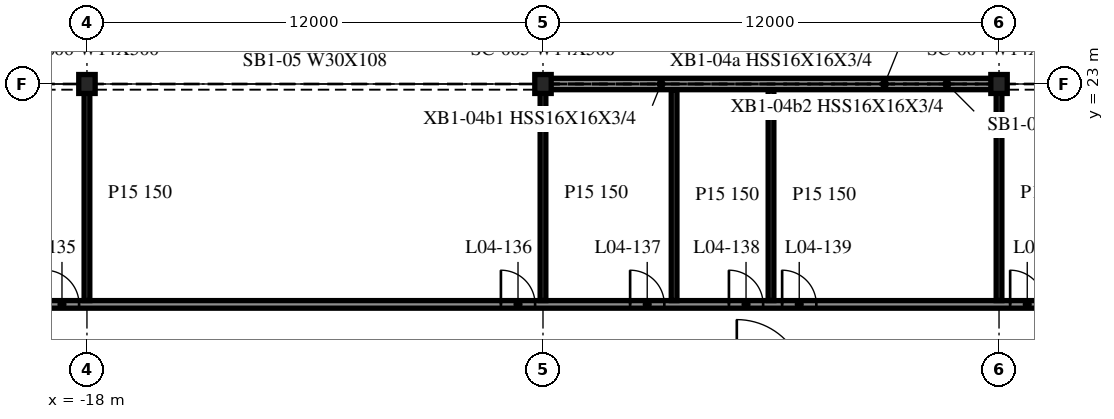
"""IFC4 building model, lengths in metres.
Left out: names, types, materials, properties, quantities, classifications, styles, units other than length and angle.
Written with IfcOpenShell. Run it as: python <this file> out.ifc"""

import sys

from ifc_helpers import new_model, si_unit, direction, frame, frame_2d, origin, origin_2d, place, context, subcontext, project, spatial, rectangle, i_section, extrude, element, fill, save


model = new_model("IFC4")
c1 = context("Model", 3, precision=1e-05, world=origin(), true_north=direction((0.0, 1.0)))
c2 = subcontext(c1, "Body", "Model", "MODEL_VIEW")
j1 = project(units=[si_unit("LENGTHUNIT", "METRE"), si_unit("PLANEANGLEUNIT", "RADIAN")], contexts=[c1])
p1 = place(None, origin())
s1 = spatial("IfcSite", under=j1, at=p1, CompositionType="ELEMENT")
p2 = place(p1, origin())
s2 = spatial("IfcBuilding", under=s1, at=p2, CompositionType="ELEMENT")
p3 = place(p2, frame((0.0, 0.0, 20.1)))
s3 = spatial("IfcBuildingStorey", under=s2, at=p3, CompositionType="ELEMENT", Elevation=20.1)
for number, where, z_axis, x_axis in (
    (1, (6.0, 23.0, -0.34), (0.0, 0.0, 1.0), (1.0, 0.0, 0.0)),
    (2, (-6.0, 23.0, -0.34), (0.0, 0.0, 1.0), (1.0, 0.0, 0.0)),
    (3, (-18.0, 23.0, -0.34), (0.0, 0.0, 1.0), (1.0, 0.0, 0.0)),
):
    element("IfcColumn", number, at=place(p3, frame(where, z_axis=z_axis, x_axis=x_axis)), inside=s3, PredefinedType="COLUMN", context=c2, shape_type="SweptSolid", body=[
        extrude(i_section(OverallWidth=0.432, OverallDepth=0.498, WebThickness=0.056, FlangeThickness=0.089, at=origin_2d()), origin(), (0.0, 0.0, 1.0), 4.3),
    ])
p4 = place(p3, frame((5.972, 23.0, 0.0), z_axis=(0.0, 0.0, 1.0), x_axis=(-1.0, 0.0, 0.0)))
e4 = element("IfcWall", 4, at=p4, inside=s3, PredefinedType="NOTDEFINED", context=c2, shape_type="SweptSolid", body=[
    extrude(rectangle(XDim=11.944, YDim=0.3, at=frame_2d((5.972, 0.0))), origin(), (0.0, 0.0, 1.0), 3.203),
])
p5 = place(p3, frame((-47.807, 17.2, 0.0), z_axis=(0.0, 0.0, 1.0), x_axis=(1.0, 0.0, 0.0)))
e5 = element("IfcWall", 5, at=p5, inside=s3, PredefinedType="PARTITIONING", context=c2, shape_type="SweptSolid", body=[
    extrude(rectangle(XDim=95.615, YDim=0.2, at=frame_2d((47.807, 0.0))), origin(), (0.0, 0.0, 1.0), 3.96),
])
p6 = place(p5, frame((4.7, 0.0, 0.0)))
e6 = element("IfcOpeningElement", 6, at=p6, cuts=e5, PredefinedType="OPENING", context=c2, shape_type="SweptSolid", body=[
    extrude(rectangle(XDim=0.9, YDim=2.1, at=frame_2d((0.45, 1.05))), frame((0.0, 0.11, 0.0), z_axis=(0.0, -1.0, 0.0), x_axis=(1.0, 0.0, 0.0)), (0.0, 0.0, 1.0), 0.22),
])
p7 = place(p5, frame((16.7, 0.0, 0.0)))
e7 = element("IfcOpeningElement", 7, at=p7, cuts=e5, PredefinedType="OPENING", context=c2, shape_type="SweptSolid", body=[
    extrude(rectangle(XDim=0.9, YDim=2.1, at=frame_2d((0.45, 1.05))), frame((0.0, 0.11, 0.0), z_axis=(0.0, -1.0, 0.0), x_axis=(1.0, 0.0, 0.0)), (0.0, 0.0, 1.0), 0.22),
])
p8 = place(p5, frame((20.1, 0.0, 0.0)))
e8 = element("IfcOpeningElement", 8, at=p8, cuts=e5, PredefinedType="OPENING", context=c2, shape_type="SweptSolid", body=[
    extrude(rectangle(XDim=0.9, YDim=2.1, at=frame_2d((0.45, 1.05))), frame((0.0, 0.11, 0.0), z_axis=(0.0, -1.0, 0.0), x_axis=(1.0, 0.0, 0.0)), (0.0, 0.0, 1.0), 0.22),
])
p9 = place(p5, frame((22.7, 0.0, 0.0)))
e9 = element("IfcOpeningElement", 9, at=p9, cuts=e5, PredefinedType="OPENING", context=c2, shape_type="SweptSolid", body=[
    extrude(rectangle(XDim=0.9, YDim=2.1, at=frame_2d((0.45, 1.05))), frame((0.0, 0.11, 0.0), z_axis=(0.0, -1.0, 0.0), x_axis=(1.0, 0.0, 0.0)), (0.0, 0.0, 1.0), 0.22),
])
p10 = place(p5, frame((28.7, 0.0, 0.0)))
e10 = element("IfcOpeningElement", 10, at=p10, cuts=e5, PredefinedType="OPENING", context=c2, shape_type="SweptSolid", body=[
    extrude(rectangle(XDim=0.9, YDim=2.1, at=frame_2d((0.45, 1.05))), frame((0.0, 0.11, 0.0), z_axis=(0.0, -1.0, 0.0), x_axis=(1.0, 0.0, 0.0)), (0.0, 0.0, 1.0), 0.22),
])
p11 = place(p5, frame((40.7, 0.0, 0.0)))
e11 = element("IfcOpeningElement", 11, at=p11, cuts=e5, PredefinedType="OPENING", context=c2, shape_type="SweptSolid", body=[
    extrude(rectangle(XDim=0.9, YDim=2.1, at=frame_2d((0.45, 1.05))), frame((0.0, 0.11, 0.0), z_axis=(0.0, -1.0, 0.0), x_axis=(1.0, 0.0, 0.0)), (0.0, 0.0, 1.0), 0.22),
])
p12 = place(p5, frame((44.1, 0.0, 0.0)))
e12 = element("IfcOpeningElement", 12, at=p12, cuts=e5, PredefinedType="OPENING", context=c2, shape_type="SweptSolid", body=[
    extrude(rectangle(XDim=0.9, YDim=2.1, at=frame_2d((0.45, 1.05))), frame((0.0, 0.11, 0.0), z_axis=(0.0, -1.0, 0.0), x_axis=(1.0, 0.0, 0.0)), (0.0, 0.0, 1.0), 0.22),
])
p13 = place(p5, frame((46.7, 0.0, 0.0)))
e13 = element("IfcOpeningElement", 13, at=p13, cuts=e5, PredefinedType="OPENING", context=c2, shape_type="SweptSolid", body=[
    extrude(rectangle(XDim=0.9, YDim=2.1, at=frame_2d((0.45, 1.05))), frame((0.0, 0.11, 0.0), z_axis=(0.0, -1.0, 0.0), x_axis=(1.0, 0.0, 0.0)), (0.0, 0.0, 1.0), 0.22),
])
p14 = place(p5, frame((48.1, 0.0, 0.0)))
e14 = element("IfcOpeningElement", 14, at=p14, cuts=e5, PredefinedType="OPENING", context=c2, shape_type="SweptSolid", body=[
    extrude(rectangle(XDim=0.9, YDim=2.1, at=frame_2d((0.45, 1.05))), frame((0.0, 0.11, 0.0), z_axis=(0.0, -1.0, 0.0), x_axis=(1.0, 0.0, 0.0)), (0.0, 0.0, 1.0), 0.22),
])
p15 = place(p5, frame((54.1, 0.0, 0.0)))
e15 = element("IfcOpeningElement", 15, at=p15, cuts=e5, PredefinedType="OPENING", context=c2, shape_type="SweptSolid", body=[
    extrude(rectangle(XDim=0.9, YDim=2.1, at=frame_2d((0.45, 1.05))), frame((0.0, 0.11, 0.0), z_axis=(0.0, -1.0, 0.0), x_axis=(1.0, 0.0, 0.0)), (0.0, 0.0, 1.0), 0.22),
])
p16 = place(p5, frame((66.1, 0.0, 0.0)))
e16 = element("IfcOpeningElement", 16, at=p16, cuts=e5, PredefinedType="OPENING", context=c2, shape_type="SweptSolid", body=[
    extrude(rectangle(XDim=0.9, YDim=2.1, at=frame_2d((0.45, 1.05))), frame((0.0, 0.11, 0.0), z_axis=(0.0, -1.0, 0.0), x_axis=(1.0, 0.0, 0.0)), (0.0, 0.0, 1.0), 0.22),
])
p17 = place(p5, frame((69.5, 0.0, 0.0)))
e17 = element("IfcOpeningElement", 17, at=p17, cuts=e5, PredefinedType="OPENING", context=c2, shape_type="SweptSolid", body=[
    extrude(rectangle(XDim=0.9, YDim=2.1, at=frame_2d((0.45, 1.05))), frame((0.0, 0.11, 0.0), z_axis=(0.0, -1.0, 0.0), x_axis=(1.0, 0.0, 0.0)), (0.0, 0.0, 1.0), 0.22),
])
p18 = place(p5, frame((72.1, 0.0, 0.0)))
e18 = element("IfcOpeningElement", 18, at=p18, cuts=e5, PredefinedType="OPENING", context=c2, shape_type="SweptSolid", body=[
    extrude(rectangle(XDim=0.9, YDim=2.1, at=frame_2d((0.45, 1.05))), frame((0.0, 0.11, 0.0), z_axis=(0.0, -1.0, 0.0), x_axis=(1.0, 0.0, 0.0)), (0.0, 0.0, 1.0), 0.22),
])
p19 = place(p5, frame((78.1, 0.0, 0.0)))
e19 = element("IfcOpeningElement", 19, at=p19, cuts=e5, PredefinedType="OPENING", context=c2, shape_type="SweptSolid", body=[
    extrude(rectangle(XDim=0.9, YDim=2.1, at=frame_2d((0.45, 1.05))), frame((0.0, 0.11, 0.0), z_axis=(0.0, -1.0, 0.0), x_axis=(1.0, 0.0, 0.0)), (0.0, 0.0, 1.0), 0.22),
])
p20 = place(p5, frame((90.1, 0.0, 0.0)))
e20 = element("IfcOpeningElement", 20, at=p20, cuts=e5, PredefinedType="OPENING", context=c2, shape_type="SweptSolid", body=[
    extrude(rectangle(XDim=0.9, YDim=2.1, at=frame_2d((0.45, 1.05))), frame((0.0, 0.11, 0.0), z_axis=(0.0, -1.0, 0.0), x_axis=(1.0, 0.0, 0.0)), (0.0, 0.0, 1.0), 0.22),
])
for number, where, z_axis, x_axis in (
    (21, (-18.0, 17.3, 0.0), (0.0, 0.0, 1.0), (0.0, 1.0, 0.0)),
    (22, (-6.0, 17.3, 0.0), (0.0, 0.0, 1.0), (0.0, 1.0, 0.0)),
):
    element("IfcWall", number, at=place(p3, frame(where, z_axis=z_axis, x_axis=x_axis)), inside=s3, PredefinedType="PARTITIONING", context=c2, shape_type="SweptSolid", body=[
        extrude(rectangle(XDim=5.675, YDim=0.15, at=frame_2d((2.837, 0.0))), origin(), (0.0, 0.0, 1.0), 3.96),
    ])
for number, where, z_axis, x_axis in (
    (23, (-2.55, 17.3, 0.0), (0.0, 0.0, 1.0), (0.0, 1.0, 0.0)),
    (24, (0.0, 17.3, 0.0), (0.0, 0.0, 1.0), (0.0, 1.0, 0.0)),
):
    element("IfcWall", number, at=place(p3, frame(where, z_axis=z_axis, x_axis=x_axis)), inside=s3, PredefinedType="PARTITIONING", context=c2, shape_type="SweptSolid", body=[
        extrude(rectangle(XDim=5.55, YDim=0.15, at=frame_2d((2.775, 0.0))), origin(), (0.0, 0.0, 1.0), 3.96),
    ])
p21 = place(p3, frame((6.0, 17.3, 0.0), z_axis=(0.0, 0.0, 1.0), x_axis=(0.0, 1.0, 0.0)))
e25 = element("IfcWall", 25, at=p21, inside=s3, PredefinedType="PARTITIONING", context=c2, shape_type="SweptSolid", body=[
    extrude(rectangle(XDim=5.675, YDim=0.15, at=frame_2d((2.837, 0.0))), origin(), (0.0, 0.0, 1.0), 3.96),
])
p22 = place(p10, origin())
e26 = element("IfcDoor", 26, at=p22, inside=s3, OperationType="SINGLE_SWING_LEFT", PredefinedType="DOOR", context=c2, shape_type="SweptSolid", body=[
    extrude(rectangle(XDim=0.9, YDim=2.1, at=frame_2d((0.45, 1.05))), frame((0.0, 0.025, 0.0), z_axis=(0.0, -1.0, 0.0), x_axis=(1.0, 0.0, 0.0)), (0.0, 0.0, 1.0), 0.05),
])
fill(e10, e26)
p23 = place(p11, origin())
e27 = element("IfcDoor", 27, at=p23, inside=s3, OperationType="SINGLE_SWING_LEFT", PredefinedType="DOOR", context=c2, shape_type="SweptSolid", body=[
    extrude(rectangle(XDim=0.9, YDim=2.1, at=frame_2d((0.45, 1.05))), frame((0.0, 0.025, 0.0), z_axis=(0.0, -1.0, 0.0), x_axis=(1.0, 0.0, 0.0)), (0.0, 0.0, 1.0), 0.05),
])
fill(e11, e27)
p24 = place(p12, origin())
e28 = element("IfcDoor", 28, at=p24, inside=s3, OperationType="SINGLE_SWING_LEFT", PredefinedType="DOOR", context=c2, shape_type="SweptSolid", body=[
    extrude(rectangle(XDim=0.9, YDim=2.1, at=frame_2d((0.45, 1.05))), frame((0.0, 0.025, 0.0), z_axis=(0.0, -1.0, 0.0), x_axis=(1.0, 0.0, 0.0)), (0.0, 0.0, 1.0), 0.05),
])
fill(e12, e28)
p25 = place(p13, origin())
e29 = element("IfcDoor", 29, at=p25, inside=s3, OperationType="SINGLE_SWING_LEFT", PredefinedType="DOOR", context=c2, shape_type="SweptSolid", body=[
    extrude(rectangle(XDim=0.9, YDim=2.1, at=frame_2d((0.45, 1.05))), frame((0.0, 0.025, 0.0), z_axis=(0.0, -1.0, 0.0), x_axis=(1.0, 0.0, 0.0)), (0.0, 0.0, 1.0), 0.05),
])
fill(e13, e29)
p26 = place(p14, origin())
e30 = element("IfcDoor", 30, at=p26, inside=s3, OperationType="SINGLE_SWING_RIGHT", PredefinedType="DOOR", context=c2, shape_type="SweptSolid", body=[
    extrude(rectangle(XDim=0.9, YDim=2.1, at=frame_2d((0.45, 1.05))), frame((0.0, 0.025, 0.0), z_axis=(0.0, -1.0, 0.0), x_axis=(1.0, 0.0, 0.0)), (0.0, 0.0, 1.0), 0.05),
])
fill(e14, e30)
p27 = place(p15, origin())
e31 = element("IfcDoor", 31, at=p27, inside=s3, OperationType="SINGLE_SWING_RIGHT", PredefinedType="DOOR", context=c2, shape_type="SweptSolid", body=[
    extrude(rectangle(XDim=0.9, YDim=2.1, at=frame_2d((0.45, 1.05))), frame((0.0, 0.025, 0.0), z_axis=(0.0, -1.0, 0.0), x_axis=(1.0, 0.0, 0.0)), (0.0, 0.0, 1.0), 0.05),
])
fill(e15, e31)
save(model, sys.argv[1])
